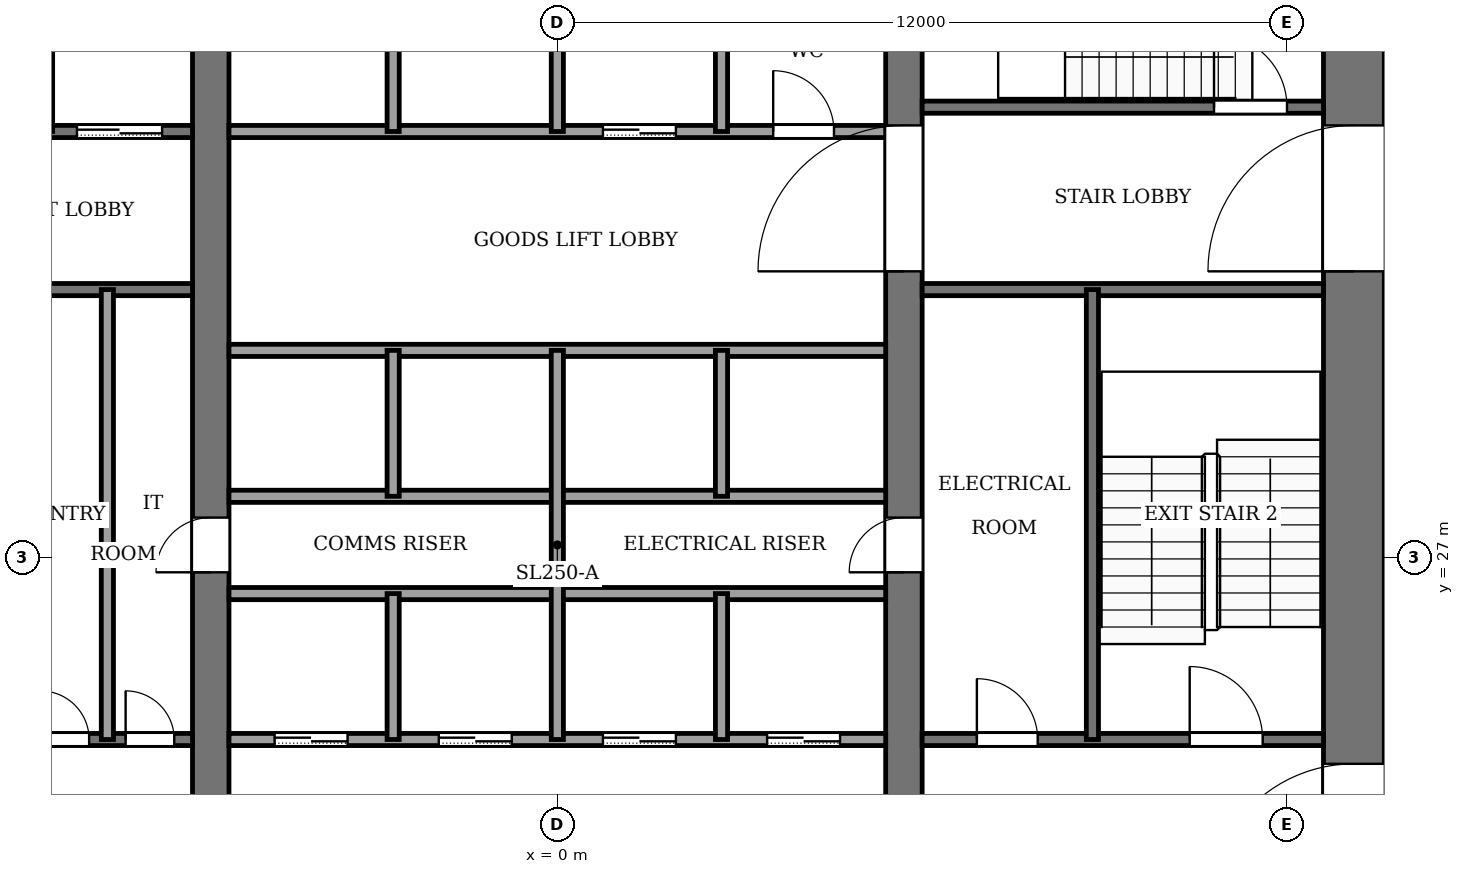
"""IFC4 building model, lengths in metres.
Left out: names, types, materials, properties, quantities, classifications, styles, units other than length and angle.
Written with IfcOpenShell. Run it as: python <this file> out.ifc"""

import sys

from ifc_helpers import new_model, si_unit, direction, frame, frame_2d, origin, place, context, subcontext, project, spatial, rectangle, extrude, element, fill, save


model = new_model("IFC4")
c1 = context("Model", 3, precision=1e-05, world=origin(), true_north=direction((0.0, 1.0)))
c2 = subcontext(c1, "Body", "Model", "MODEL_VIEW")
j1 = project(units=[si_unit("LENGTHUNIT", "METRE"), si_unit("PLANEANGLEUNIT", "RADIAN")], contexts=[c1])
p1 = place(None, origin())
s1 = spatial("IfcSite", under=j1, at=p1, CompositionType="ELEMENT")
p2 = place(p1, origin())
s2 = spatial("IfcBuilding", under=s1, at=p2, CompositionType="ELEMENT")
p3 = place(p2, frame((0.0, 0.0, 166.0)))
s3 = spatial("IfcBuildingStorey", under=s2, at=p3, CompositionType="ELEMENT", Elevation=166.0)
p4 = place(p3, frame((13.1, 18.4, -0.13), z_axis=(0.0, 0.0, 1.0), x_axis=(0.0, 1.0, 0.0)))
e1 = element("IfcWall", 1, at=p4, inside=s3, PredefinedType="SHEAR", context=c2, shape_type="SweptSolid", body=[
    extrude(rectangle(XDim=19.2, YDim=1.0, at=frame_2d((9.6, 0.0))), origin(), (0.0, 0.0, 1.0), 3.88),
])
p5 = place(p4, frame((2.8, 0.0, 0.13)))
e2 = element("IfcOpeningElement", 2, at=p5, cuts=e1, PredefinedType="OPENING", context=c2, shape_type="SweptSolid", body=[
    extrude(rectangle(XDim=2.4, YDim=2.4, at=frame_2d((1.2, 1.2))), frame((0.0, 0.51, 0.0), z_axis=(0.0, -1.0, 0.0), x_axis=(1.0, 0.0, 0.0)), (0.0, 0.0, 1.0), 1.02),
])
p6 = place(p4, frame((13.3, 0.0, 0.13)))
e3 = element("IfcOpeningElement", 3, at=p6, cuts=e1, PredefinedType="OPENING", context=c2, shape_type="SweptSolid", body=[
    extrude(rectangle(XDim=2.4, YDim=2.4, at=frame_2d((1.2, 1.2))), frame((0.0, 0.51, 0.0), z_axis=(0.0, -1.0, 0.0), x_axis=(1.0, 0.0, 0.0)), (0.0, 0.0, 1.0), 1.02),
])
p7 = place(p3, frame((-5.7, 18.4, -0.13), z_axis=(0.0, 0.0, 1.0), x_axis=(0.0, 1.0, 0.0)))
e4 = element("IfcWall", 4, at=p7, inside=s3, PredefinedType="SHEAR", context=c2, shape_type="SweptSolid", body=[
    extrude(rectangle(XDim=19.2, YDim=0.6, at=frame_2d((9.6, 0.0))), origin(), (0.0, 0.0, 1.0), 3.88),
])
p8 = place(p7, frame((8.35, 0.0, 0.13)))
e5 = element("IfcOpeningElement", 5, at=p8, cuts=e4, PredefinedType="OPENING", context=c2, shape_type="SweptSolid", body=[
    extrude(rectangle(XDim=0.9, YDim=2.1, at=frame_2d((0.45, 1.05))), frame((0.0, 0.31, 0.0), z_axis=(0.0, -1.0, 0.0), x_axis=(1.0, 0.0, 0.0)), (0.0, 0.0, 1.0), 0.62),
])
p9 = place(p3, frame((5.7, 18.4, -0.13), z_axis=(0.0, 0.0, 1.0), x_axis=(0.0, 1.0, 0.0)))
e6 = element("IfcWall", 6, at=p9, inside=s3, PredefinedType="SHEAR", context=c2, shape_type="SweptSolid", body=[
    extrude(rectangle(XDim=19.2, YDim=0.6, at=frame_2d((9.6, 0.0))), origin(), (0.0, 0.0, 1.0), 3.88),
])
p10 = place(p9, frame((8.35, 0.0, 0.13)))
e7 = element("IfcOpeningElement", 7, at=p10, cuts=e6, PredefinedType="OPENING", context=c2, shape_type="SweptSolid", body=[
    extrude(rectangle(XDim=0.9, YDim=2.1, at=frame_2d((0.45, 1.05))), frame((0.0, 0.31, 0.0), z_axis=(0.0, -1.0, 0.0), x_axis=(1.0, 0.0, 0.0)), (0.0, 0.0, 1.0), 0.62),
])
p11 = place(p9, frame((13.3, 0.0, 0.13)))
e8 = element("IfcOpeningElement", 8, at=p11, cuts=e6, PredefinedType="OPENING", context=c2, shape_type="SweptSolid", body=[
    extrude(rectangle(XDim=2.4, YDim=2.4, at=frame_2d((1.2, 1.2))), frame((0.0, 0.31, 0.0), z_axis=(0.0, -1.0, 0.0), x_axis=(1.0, 0.0, 0.0)), (0.0, 0.0, 1.0), 0.62),
])
p12 = place(p3, frame((-12.6, 24.0, 0.0), z_axis=(0.0, 0.0, 1.0), x_axis=(1.0, 0.0, 0.0)))
e9 = element("IfcWall", 9, at=p12, inside=s3, PredefinedType="PARTITIONING", context=c2, shape_type="SweptSolid", body=[
    extrude(rectangle(XDim=6.6, YDim=0.2, at=frame_2d((3.3, 0.0))), origin(), (0.0, 0.0, 1.0), 3.75),
])
p13 = place(p12, frame((4.1, 0.0, 0.0)))
e10 = element("IfcOpeningElement", 10, at=p13, cuts=e9, PredefinedType="OPENING", context=c2, shape_type="SweptSolid", body=[
    extrude(rectangle(XDim=0.8, YDim=2.1, at=frame_2d((0.4, 1.05))), frame((0.0, 0.11, 0.0), z_axis=(0.0, -1.0, 0.0), x_axis=(1.0, 0.0, 0.0)), (0.0, 0.0, 1.0), 0.22),
])
p14 = place(p12, frame((5.5, 0.0, 0.0)))
e11 = element("IfcOpeningElement", 11, at=p14, cuts=e9, PredefinedType="OPENING", context=c2, shape_type="SweptSolid", body=[
    extrude(rectangle(XDim=0.8, YDim=2.1, at=frame_2d((0.4, 1.05))), frame((0.0, 0.11, 0.0), z_axis=(0.0, -1.0, 0.0), x_axis=(1.0, 0.0, 0.0)), (0.0, 0.0, 1.0), 0.22),
])
p15 = place(p3, frame((-5.4, 24.0, 0.0), z_axis=(0.0, 0.0, 1.0), x_axis=(1.0, 0.0, 0.0)))
e12 = element("IfcWall", 12, at=p15, inside=s3, PredefinedType="PARTITIONING", context=c2, shape_type="SweptSolid", body=[
    extrude(rectangle(XDim=10.8, YDim=0.2, at=frame_2d((5.4, 0.0))), origin(), (0.0, 0.0, 1.0), 3.75),
])
p16 = place(p15, frame((0.75, 0.0, 0.0)))
e13 = element("IfcOpeningElement", 13, at=p16, cuts=e12, PredefinedType="OPENING", context=c2, shape_type="SweptSolid", body=[
    extrude(rectangle(XDim=1.2, YDim=2.2, at=frame_2d((0.6, 1.1))), frame((0.0, 0.11, 0.0), z_axis=(0.0, -1.0, 0.0), x_axis=(1.0, 0.0, 0.0)), (0.0, 0.0, 1.0), 0.22),
])
p17 = place(p15, frame((3.45, 0.0, 0.0)))
e14 = element("IfcOpeningElement", 14, at=p17, cuts=e12, PredefinedType="OPENING", context=c2, shape_type="SweptSolid", body=[
    extrude(rectangle(XDim=1.2, YDim=2.2, at=frame_2d((0.6, 1.1))), frame((0.0, 0.11, 0.0), z_axis=(0.0, -1.0, 0.0), x_axis=(1.0, 0.0, 0.0)), (0.0, 0.0, 1.0), 0.22),
])
p18 = place(p15, frame((6.15, 0.0, 0.0)))
e15 = element("IfcOpeningElement", 15, at=p18, cuts=e12, PredefinedType="OPENING", context=c2, shape_type="SweptSolid", body=[
    extrude(rectangle(XDim=1.2, YDim=2.2, at=frame_2d((0.6, 1.1))), frame((0.0, 0.11, 0.0), z_axis=(0.0, -1.0, 0.0), x_axis=(1.0, 0.0, 0.0)), (0.0, 0.0, 1.0), 0.22),
])
p19 = place(p15, frame((8.85, 0.0, 0.0)))
e16 = element("IfcOpeningElement", 16, at=p19, cuts=e12, PredefinedType="OPENING", context=c2, shape_type="SweptSolid", body=[
    extrude(rectangle(XDim=1.2, YDim=2.2, at=frame_2d((0.6, 1.1))), frame((0.0, 0.11, 0.0), z_axis=(0.0, -1.0, 0.0), x_axis=(1.0, 0.0, 0.0)), (0.0, 0.0, 1.0), 0.22),
])
p20 = place(p3, frame((6.0, 24.0, 0.0), z_axis=(0.0, 0.0, 1.0), x_axis=(1.0, 0.0, 0.0)))
e17 = element("IfcWall", 17, at=p20, inside=s3, PredefinedType="PARTITIONING", context=c2, shape_type="SweptSolid", body=[
    extrude(rectangle(XDim=6.6, YDim=0.2, at=frame_2d((3.3, 0.0))), origin(), (0.0, 0.0, 1.0), 3.75),
])
p21 = place(p20, frame((0.9, 0.0, 0.0)))
e18 = element("IfcOpeningElement", 18, at=p21, cuts=e17, PredefinedType="OPENING", context=c2, shape_type="SweptSolid", body=[
    extrude(rectangle(XDim=1.0, YDim=2.1, at=frame_2d((0.5, 1.05))), frame((0.0, 0.11, 0.0), z_axis=(0.0, -1.0, 0.0), x_axis=(1.0, 0.0, 0.0)), (0.0, 0.0, 1.0), 0.22),
])
p22 = place(p20, frame((4.4, 0.0, 0.0)))
e19 = element("IfcOpeningElement", 19, at=p22, cuts=e17, PredefinedType="OPENING", context=c2, shape_type="SweptSolid", body=[
    extrude(rectangle(XDim=1.2, YDim=2.2, at=frame_2d((0.6, 1.1))), frame((0.0, 0.11, 0.0), z_axis=(0.0, -1.0, 0.0), x_axis=(1.0, 0.0, 0.0)), (0.0, 0.0, 1.0), 0.22),
])
for number, where, z_axis, x_axis in (
    (20, (-5.4, 26.4, 0.0), (0.0, 0.0, 1.0), (1.0, 0.0, 0.0)),
    (21, (-5.4, 28.0, 0.0), (0.0, 0.0, 1.0), (1.0, 0.0, 0.0)),
    (22, (-5.4, 30.4, 0.0), (0.0, 0.0, 1.0), (1.0, 0.0, 0.0)),
):
    element("IfcWall", number, at=place(p3, frame(where, z_axis=z_axis, x_axis=x_axis)), inside=s3, PredefinedType="PARTITIONING", context=c2, shape_type="SweptSolid", body=[
        extrude(rectangle(XDim=10.8, YDim=0.2, at=frame_2d((5.4, 0.0))), origin(), (0.0, 0.0, 1.0), 3.75),
    ])
p23 = place(p3, frame((-12.6, 31.4, 0.0), z_axis=(0.0, 0.0, 1.0), x_axis=(1.0, 0.0, 0.0)))
e23 = element("IfcWall", 23, at=p23, inside=s3, PredefinedType="PARTITIONING", context=c2, shape_type="SweptSolid", body=[
    extrude(rectangle(XDim=6.6, YDim=0.2, at=frame_2d((3.3, 0.0))), origin(), (0.0, 0.0, 1.0), 3.75),
])
p24 = place(p23, frame((1.0, 0.0, 0.0)))
e24 = element("IfcOpeningElement", 24, at=p24, cuts=e23, PredefinedType="OPENING", context=c2, shape_type="SweptSolid", body=[
    extrude(rectangle(XDim=1.2, YDim=2.2, at=frame_2d((0.6, 1.1))), frame((0.0, 0.11, 0.0), z_axis=(0.0, -1.0, 0.0), x_axis=(1.0, 0.0, 0.0)), (0.0, 0.0, 1.0), 0.22),
])
p25 = place(p3, frame((6.0, 31.4, 0.0), z_axis=(0.0, 0.0, 1.0), x_axis=(1.0, 0.0, 0.0)))
e25 = element("IfcWall", 25, at=p25, inside=s3, PredefinedType="PARTITIONING", context=c2, shape_type="SweptSolid", body=[
    extrude(rectangle(XDim=6.6, YDim=0.2, at=frame_2d((3.3, 0.0))), origin(), (0.0, 0.0, 1.0), 3.75),
])
p26 = place(p3, frame((-12.6, 34.0, 0.0), z_axis=(0.0, 0.0, 1.0), x_axis=(1.0, 0.0, 0.0)))
e26 = element("IfcWall", 26, at=p26, inside=s3, PredefinedType="PARTITIONING", context=c2, shape_type="SweptSolid", body=[
    extrude(rectangle(XDim=6.6, YDim=0.2, at=frame_2d((3.3, 0.0))), origin(), (0.0, 0.0, 1.0), 3.75),
])
p27 = place(p26, frame((4.7, 0.0, 0.0)))
e27 = element("IfcOpeningElement", 27, at=p27, cuts=e26, PredefinedType="OPENING", context=c2, shape_type="SweptSolid", body=[
    extrude(rectangle(XDim=1.4, YDim=2.2, at=frame_2d((0.7, 1.1))), frame((0.0, 0.11, 0.0), z_axis=(0.0, -1.0, 0.0), x_axis=(1.0, 0.0, 0.0)), (0.0, 0.0, 1.0), 0.22),
])
p28 = place(p26, frame((2.3, 0.0, 0.0)))
e28 = element("IfcOpeningElement", 28, at=p28, cuts=e26, PredefinedType="OPENING", context=c2, shape_type="SweptSolid", body=[
    extrude(rectangle(XDim=1.4, YDim=2.2, at=frame_2d((0.7, 1.1))), frame((0.0, 0.11, 0.0), z_axis=(0.0, -1.0, 0.0), x_axis=(1.0, 0.0, 0.0)), (0.0, 0.0, 1.0), 0.22),
])
p29 = place(p26, frame((0.45, 0.0, 0.0)))
e29 = element("IfcOpeningElement", 29, at=p29, cuts=e26, PredefinedType="OPENING", context=c2, shape_type="SweptSolid", body=[
    extrude(rectangle(XDim=0.9, YDim=2.1, at=frame_2d((0.45, 1.05))), frame((0.0, 0.11, 0.0), z_axis=(0.0, -1.0, 0.0), x_axis=(1.0, 0.0, 0.0)), (0.0, 0.0, 1.0), 0.22),
])
p30 = place(p3, frame((-5.4, 34.0, 0.0), z_axis=(0.0, 0.0, 1.0), x_axis=(1.0, 0.0, 0.0)))
e30 = element("IfcWall", 30, at=p30, inside=s3, PredefinedType="PARTITIONING", context=c2, shape_type="SweptSolid", body=[
    extrude(rectangle(XDim=10.8, YDim=0.2, at=frame_2d((5.4, 0.0))), origin(), (0.0, 0.0, 1.0), 3.75),
])
p31 = place(p30, frame((6.15, 0.0, 0.0)))
e31 = element("IfcOpeningElement", 31, at=p31, cuts=e30, PredefinedType="OPENING", context=c2, shape_type="SweptSolid", body=[
    extrude(rectangle(XDim=1.2, YDim=2.2, at=frame_2d((0.6, 1.1))), frame((0.0, 0.11, 0.0), z_axis=(0.0, -1.0, 0.0), x_axis=(1.0, 0.0, 0.0)), (0.0, 0.0, 1.0), 0.22),
])
p32 = place(p30, frame((8.95, 0.0, 0.0)))
e32 = element("IfcOpeningElement", 32, at=p32, cuts=e30, PredefinedType="OPENING", context=c2, shape_type="SweptSolid", body=[
    extrude(rectangle(XDim=1.0, YDim=2.1, at=frame_2d((0.5, 1.05))), frame((0.0, 0.11, 0.0), z_axis=(0.0, -1.0, 0.0), x_axis=(1.0, 0.0, 0.0)), (0.0, 0.0, 1.0), 0.22),
])
p33 = place(p3, frame((6.0, 34.4, 0.0), z_axis=(0.0, 0.0, 1.0), x_axis=(1.0, 0.0, 0.0)))
e33 = element("IfcWall", 33, at=p33, inside=s3, PredefinedType="PARTITIONING", context=c2, shape_type="SweptSolid", body=[
    extrude(rectangle(XDim=6.6, YDim=0.2, at=frame_2d((3.3, 0.0))), origin(), (0.0, 0.0, 1.0), 3.75),
])
p34 = place(p33, frame((4.8, 0.0, 0.0)))
e34 = element("IfcOpeningElement", 34, at=p34, cuts=e33, PredefinedType="OPENING", context=c2, shape_type="SweptSolid", body=[
    extrude(rectangle(XDim=1.2, YDim=2.2, at=frame_2d((0.6, 1.1))), frame((0.0, 0.11, 0.0), z_axis=(0.0, -1.0, 0.0), x_axis=(1.0, 0.0, 0.0)), (0.0, 0.0, 1.0), 0.22),
])
p35 = place(p3, frame((-8.4, 34.0, 0.0), z_axis=(0.0, 0.0, 1.0), x_axis=(0.0, 1.0, 0.0)))
e35 = element("IfcWall", 35, at=p35, inside=s3, PredefinedType="PARTITIONING", context=c2, shape_type="SweptSolid", body=[
    extrude(rectangle(XDim=3.6, YDim=0.2, at=frame_2d((1.8, 0.0))), origin(), (0.0, 0.0, 1.0), 3.75),
])
p36 = place(p3, frame((-7.4, 24.0, 0.0), z_axis=(0.0, 0.0, 1.0), x_axis=(0.0, 1.0, 0.0)))
e36 = element("IfcWall", 36, at=p36, inside=s3, PredefinedType="PARTITIONING", context=c2, shape_type="SweptSolid", body=[
    extrude(rectangle(XDim=7.4, YDim=0.2, at=frame_2d((3.7, 0.0))), origin(), (0.0, 0.0, 1.0), 3.75),
])
for number, where, z_axis, x_axis in (
    (37, (-2.7, 24.0, 0.0), (0.0, 0.0, 1.0), (0.0, 1.0, 0.0)),
    (38, (-2.7, 28.0, 0.0), (0.0, 0.0, 1.0), (0.0, 1.0, 0.0)),
):
    element("IfcWall", number, at=place(p3, frame(where, z_axis=z_axis, x_axis=x_axis)), inside=s3, PredefinedType="PARTITIONING", context=c2, shape_type="SweptSolid", body=[
        extrude(rectangle(XDim=2.4, YDim=0.2, at=frame_2d((1.2, 0.0))), origin(), (0.0, 0.0, 1.0), 3.75),
    ])
p37 = place(p3, frame((-2.7, 34.0, 0.0), z_axis=(0.0, 0.0, 1.0), x_axis=(0.0, 1.0, 0.0)))
e39 = element("IfcWall", 39, at=p37, inside=s3, PredefinedType="PARTITIONING", context=c2, shape_type="SweptSolid", body=[
    extrude(rectangle(XDim=3.6, YDim=0.2, at=frame_2d((1.8, 0.0))), origin(), (0.0, 0.0, 1.0), 3.75),
])
p38 = place(p3, frame((0.0, 24.0, 0.0), z_axis=(0.0, 0.0, 1.0), x_axis=(0.0, 1.0, 0.0)))
e40 = element("IfcWall", 40, at=p38, inside=s3, PredefinedType="PARTITIONING", context=c2, shape_type="SweptSolid", body=[
    extrude(rectangle(XDim=6.4, YDim=0.2, at=frame_2d((3.2, 0.0))), origin(), (0.0, 0.0, 1.0), 3.75),
])
p39 = place(p3, frame((0.0, 34.0, 0.0), z_axis=(0.0, 0.0, 1.0), x_axis=(0.0, 1.0, 0.0)))
e41 = element("IfcWall", 41, at=p39, inside=s3, PredefinedType="PARTITIONING", context=c2, shape_type="SweptSolid", body=[
    extrude(rectangle(XDim=3.6, YDim=0.2, at=frame_2d((1.8, 0.0))), origin(), (0.0, 0.0, 1.0), 3.75),
])
for number, where, z_axis, x_axis in (
    (42, (2.7, 24.0, 0.0), (0.0, 0.0, 1.0), (0.0, 1.0, 0.0)),
    (43, (2.7, 28.0, 0.0), (0.0, 0.0, 1.0), (0.0, 1.0, 0.0)),
):
    element("IfcWall", number, at=place(p3, frame(where, z_axis=z_axis, x_axis=x_axis)), inside=s3, PredefinedType="PARTITIONING", context=c2, shape_type="SweptSolid", body=[
        extrude(rectangle(XDim=2.4, YDim=0.2, at=frame_2d((1.2, 0.0))), origin(), (0.0, 0.0, 1.0), 3.75),
    ])
p40 = place(p3, frame((2.7, 34.0, 0.0), z_axis=(0.0, 0.0, 1.0), x_axis=(0.0, 1.0, 0.0)))
e44 = element("IfcWall", 44, at=p40, inside=s3, PredefinedType="PARTITIONING", context=c2, shape_type="SweptSolid", body=[
    extrude(rectangle(XDim=3.6, YDim=0.2, at=frame_2d((1.8, 0.0))), origin(), (0.0, 0.0, 1.0), 3.75),
])
p41 = place(p3, frame((8.8, 24.0, 0.0), z_axis=(0.0, 0.0, 1.0), x_axis=(0.0, 1.0, 0.0)))
e45 = element("IfcWall", 45, at=p41, inside=s3, PredefinedType="PARTITIONING", context=c2, shape_type="SweptSolid", body=[
    extrude(rectangle(XDim=7.4, YDim=0.2, at=frame_2d((3.7, 0.0))), origin(), (0.0, 0.0, 1.0), 3.75),
])
p42 = place(p16, origin())
e46 = element("IfcDoor", 46, at=p42, inside=s3, OperationType="SLIDING_TO_LEFT", PredefinedType="DOOR", context=c2, shape_type="SweptSolid", body=[
    extrude(rectangle(XDim=1.2, YDim=2.2, at=frame_2d((0.6, 1.1))), frame((0.0, 0.025, 0.0), z_axis=(0.0, -1.0, 0.0), x_axis=(1.0, 0.0, 0.0)), (0.0, 0.0, 1.0), 0.05),
])
fill(e13, e46)
p43 = place(p17, origin())
e47 = element("IfcDoor", 47, at=p43, inside=s3, OperationType="SLIDING_TO_LEFT", PredefinedType="DOOR", context=c2, shape_type="SweptSolid", body=[
    extrude(rectangle(XDim=1.2, YDim=2.2, at=frame_2d((0.6, 1.1))), frame((0.0, 0.025, 0.0), z_axis=(0.0, -1.0, 0.0), x_axis=(1.0, 0.0, 0.0)), (0.0, 0.0, 1.0), 0.05),
])
fill(e14, e47)
p44 = place(p18, origin())
e48 = element("IfcDoor", 48, at=p44, inside=s3, OperationType="SLIDING_TO_LEFT", PredefinedType="DOOR", context=c2, shape_type="SweptSolid", body=[
    extrude(rectangle(XDim=1.2, YDim=2.2, at=frame_2d((0.6, 1.1))), frame((0.0, 0.025, 0.0), z_axis=(0.0, -1.0, 0.0), x_axis=(1.0, 0.0, 0.0)), (0.0, 0.0, 1.0), 0.05),
])
fill(e15, e48)
p45 = place(p19, origin())
e49 = element("IfcDoor", 49, at=p45, inside=s3, OperationType="SLIDING_TO_LEFT", PredefinedType="DOOR", context=c2, shape_type="SweptSolid", body=[
    extrude(rectangle(XDim=1.2, YDim=2.2, at=frame_2d((0.6, 1.1))), frame((0.0, 0.025, 0.0), z_axis=(0.0, -1.0, 0.0), x_axis=(1.0, 0.0, 0.0)), (0.0, 0.0, 1.0), 0.05),
])
fill(e16, e49)
p46 = place(p31, origin())
e50 = element("IfcDoor", 50, at=p46, inside=s3, OperationType="SLIDING_TO_LEFT", PredefinedType="DOOR", context=c2, shape_type="SweptSolid", body=[
    extrude(rectangle(XDim=1.2, YDim=2.2, at=frame_2d((0.6, 1.1))), frame((0.0, 0.025, 0.0), z_axis=(0.0, -1.0, 0.0), x_axis=(1.0, 0.0, 0.0)), (0.0, 0.0, 1.0), 0.05),
])
fill(e31, e50)
p47 = place(p27, origin())
e51 = element("IfcDoor", 51, at=p47, inside=s3, OperationType="SLIDING_TO_LEFT", PredefinedType="DOOR", context=c2, shape_type="SweptSolid", body=[
    extrude(rectangle(XDim=1.4, YDim=2.2, at=frame_2d((0.7, 1.1))), frame((0.0, 0.025, 0.0), z_axis=(0.0, -1.0, 0.0), x_axis=(1.0, 0.0, 0.0)), (0.0, 0.0, 1.0), 0.05),
])
fill(e27, e51)
p48 = place(p13, origin())
e52 = element("IfcDoor", 52, at=p48, inside=s3, OperationType="SINGLE_SWING_LEFT", PredefinedType="DOOR", context=c2, shape_type="SweptSolid", body=[
    extrude(rectangle(XDim=0.8, YDim=2.1, at=frame_2d((0.4, 1.05))), frame((0.0, 0.025, 0.0), z_axis=(0.0, -1.0, 0.0), x_axis=(1.0, 0.0, 0.0)), (0.0, 0.0, 1.0), 0.05),
])
fill(e10, e52)
p49 = place(p14, origin())
e53 = element("IfcDoor", 53, at=p49, inside=s3, OperationType="SINGLE_SWING_RIGHT", PredefinedType="DOOR", context=c2, shape_type="SweptSolid", body=[
    extrude(rectangle(XDim=0.8, YDim=2.1, at=frame_2d((0.4, 1.05))), frame((0.0, 0.025, 0.0), z_axis=(0.0, -1.0, 0.0), x_axis=(1.0, 0.0, 0.0)), (0.0, 0.0, 1.0), 0.05),
])
fill(e11, e53)
p50 = place(p21, origin())
e54 = element("IfcDoor", 54, at=p50, inside=s3, OperationType="SINGLE_SWING_RIGHT", PredefinedType="DOOR", context=c2, shape_type="SweptSolid", body=[
    extrude(rectangle(XDim=1.0, YDim=2.1, at=frame_2d((0.5, 1.05))), frame((0.0, 0.025, 0.0), z_axis=(0.0, -1.0, 0.0), x_axis=(1.0, 0.0, 0.0)), (0.0, 0.0, 1.0), 0.05),
])
fill(e18, e54)
p51 = place(p32, origin())
e55 = element("IfcDoor", 55, at=p51, inside=s3, OperationType="SINGLE_SWING_LEFT", PredefinedType="DOOR", context=c2, shape_type="SweptSolid", body=[
    extrude(rectangle(XDim=1.0, YDim=2.1, at=frame_2d((0.5, 1.05))), frame((0.0, 0.025, 0.0), z_axis=(0.0, -1.0, 0.0), x_axis=(1.0, 0.0, 0.0)), (0.0, 0.0, 1.0), 0.05),
])
fill(e32, e55)
p52 = place(p8, origin())
e56 = element("IfcDoor", 56, at=p52, inside=s3, OperationType="SINGLE_SWING_LEFT", PredefinedType="DOOR", context=c2, shape_type="SweptSolid", body=[
    extrude(rectangle(XDim=0.9, YDim=2.1, at=frame_2d((0.45, 1.05))), frame((0.0, 0.025, 0.0), z_axis=(0.0, -1.0, 0.0), x_axis=(1.0, 0.0, 0.0)), (0.0, 0.0, 1.0), 0.05),
])
fill(e5, e56)
p53 = place(p10, origin())
e57 = element("IfcDoor", 57, at=p53, inside=s3, OperationType="SINGLE_SWING_RIGHT", PredefinedType="DOOR", context=c2, shape_type="SweptSolid", body=[
    extrude(rectangle(XDim=0.9, YDim=2.1, at=frame_2d((0.45, 1.05))), frame((0.0, 0.025, 0.0), z_axis=(0.0, -1.0, 0.0), x_axis=(1.0, 0.0, 0.0)), (0.0, 0.0, 1.0), 0.05),
])
fill(e7, e57)
p54 = place(p22, origin())
e58 = element("IfcDoor", 58, at=p54, inside=s3, OperationType="SINGLE_SWING_LEFT", PredefinedType="DOOR", context=c2, shape_type="SweptSolid", body=[
    extrude(rectangle(XDim=1.2, YDim=2.2, at=frame_2d((0.6, 1.1))), frame((0.0, 0.025, 0.0), z_axis=(0.0, -1.0, 0.0), x_axis=(1.0, 0.0, 0.0)), (0.0, 0.0, 1.0), 0.05),
])
fill(e19, e58)
p55 = place(p34, origin())
e59 = element("IfcDoor", 59, at=p55, inside=s3, OperationType="SINGLE_SWING_RIGHT", PredefinedType="DOOR", context=c2, shape_type="SweptSolid", body=[
    extrude(rectangle(XDim=1.2, YDim=2.2, at=frame_2d((0.6, 1.1))), frame((0.0, 0.025, 0.0), z_axis=(0.0, -1.0, 0.0), x_axis=(1.0, 0.0, 0.0)), (0.0, 0.0, 1.0), 0.05),
])
fill(e34, e59)
p56 = place(p11, origin())
e60 = element("IfcDoor", 60, at=p56, inside=s3, OperationType="DOUBLE_DOOR_SINGLE_SWING", PredefinedType="DOOR", context=c2, shape_type="SweptSolid", body=[
    extrude(rectangle(XDim=2.4, YDim=2.4, at=frame_2d((1.2, 1.2))), frame((0.0, 0.025, 0.0), z_axis=(0.0, -1.0, 0.0), x_axis=(1.0, 0.0, 0.0)), (0.0, 0.0, 1.0), 0.05),
])
fill(e8, e60)
p57 = place(p5, origin())
e61 = element("IfcDoor", 61, at=p57, inside=s3, OperationType="DOUBLE_DOOR_SINGLE_SWING", PredefinedType="DOOR", context=c2, shape_type="SweptSolid", body=[
    extrude(rectangle(XDim=2.4, YDim=2.4, at=frame_2d((1.2, 1.2))), frame((0.0, 0.025, 0.0), z_axis=(0.0, -1.0, 0.0), x_axis=(1.0, 0.0, 0.0)), (0.0, 0.0, 1.0), 0.05),
])
fill(e2, e61)
p58 = place(p6, origin())
e62 = element("IfcDoor", 62, at=p58, inside=s3, OperationType="DOUBLE_DOOR_SINGLE_SWING", PredefinedType="DOOR", context=c2, shape_type="SweptSolid", body=[
    extrude(rectangle(XDim=2.4, YDim=2.4, at=frame_2d((1.2, 1.2))), frame((0.0, 0.025, 0.0), z_axis=(0.0, -1.0, 0.0), x_axis=(1.0, 0.0, 0.0)), (0.0, 0.0, 1.0), 0.05),
])
fill(e3, e62)
save(model, sys.argv[1])
